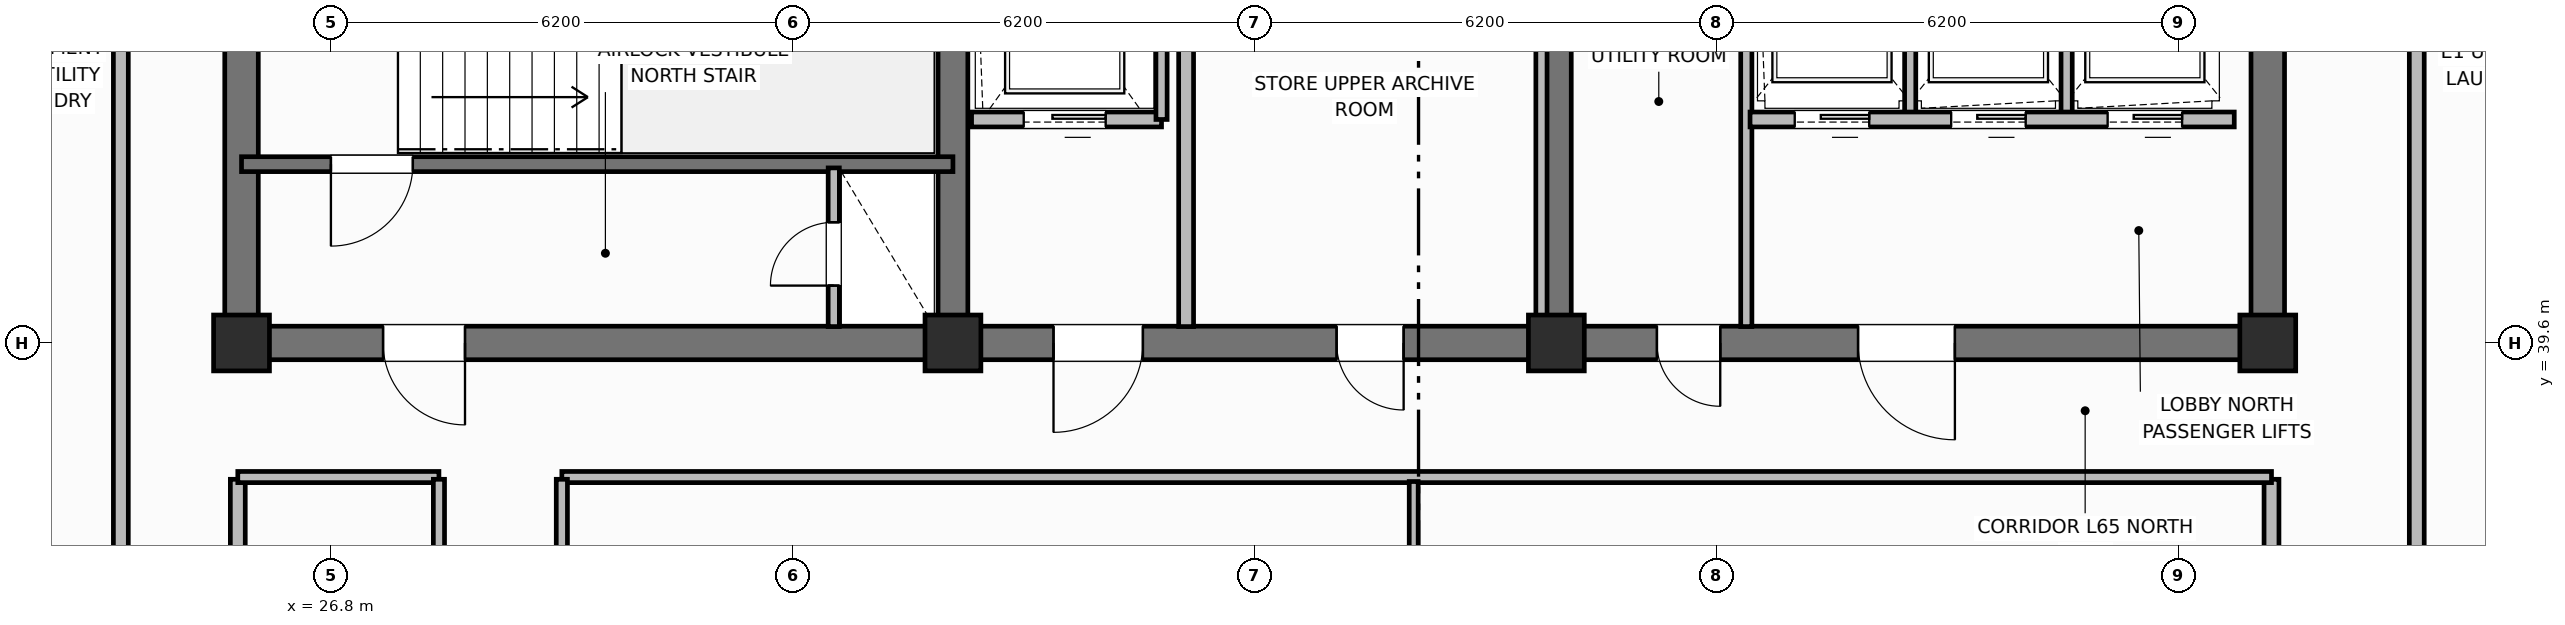
"""IFC4 building model, lengths in metres.
Left out: names, types, materials, properties, quantities, classifications, styles, units other than length and angle.
Written with IfcOpenShell. Run it as: python <this file> out.ifc"""

import sys

from ifc_helpers import new_model, si_unit, direction, frame, frame_2d, origin, origin_2d, place, context, subcontext, project, spatial, rectangle, extrude, element, fill, save


model = new_model("IFC4")
c1 = context("Model", 3, precision=1e-05, world=origin(), true_north=direction((0.0, 1.0)))
c2 = subcontext(c1, "Body", "Model", "MODEL_VIEW")
j1 = project(units=[si_unit("LENGTHUNIT", "METRE"), si_unit("PLANEANGLEUNIT", "RADIAN")], contexts=[c1])
p1 = place(None, origin())
s1 = spatial("IfcSite", under=j1, at=p1, CompositionType="ELEMENT")
p2 = place(p1, origin())
s2 = spatial("IfcBuilding", under=s1, at=p2, CompositionType="ELEMENT")
p3 = place(p2, frame((0.0, 0.0, 260.2)))
s3 = spatial("IfcBuildingStorey", under=s2, at=p3, CompositionType="ELEMENT", Elevation=260.2)
for number, where, z_axis, x_axis in (
    (1, (25.6, 39.825, 0.0), (0.0, 0.0, 1.0), (0.0, 1.0, 0.0)),
    (2, (52.8, 39.825, 0.0), (0.0, 0.0, 1.0), (0.0, 1.0, 0.0)),
):
    element("IfcWall", number, at=place(p3, frame(where, z_axis=z_axis, x_axis=x_axis)), inside=s3, PredefinedType="SHEAR", context=c2, shape_type="SweptSolid", body=[
        extrude(rectangle(XDim=5.75, YDim=0.45, at=frame_2d((2.875, 0.0))), origin(), (0.0, 0.0, 1.0), 3.7),
    ])
p4 = place(p3, frame((52.8, 39.6, 0.0), z_axis=(0.0, 0.0, 1.0), x_axis=(-1.0, 0.0, 0.0)))
e3 = element("IfcWall", 3, at=p4, inside=s3, PredefinedType="SHEAR", context=c2, shape_type="SweptSolid", body=[
    extrude(rectangle(XDim=27.2, YDim=0.45, at=frame_2d((13.6, 0.0))), origin(), (0.0, 0.0, 1.0), 3.7),
])
p5 = place(p4, frame((24.2, 0.0, 0.0)))
e4 = element("IfcOpeningElement", 4, at=p5, cuts=e3, PredefinedType="OPENING", context=c2, shape_type="SweptSolid", body=[
    extrude(rectangle(XDim=1.1, YDim=2.15, at=frame_2d((0.55, 1.075))), frame((0.0, 0.235, 0.0), z_axis=(0.0, -1.0, 0.0), x_axis=(1.0, 0.0, 0.0)), (0.0, 0.0, 1.0), 0.47),
])
p6 = place(p4, frame((15.1, 0.0, 0.0)))
e5 = element("IfcOpeningElement", 5, at=p6, cuts=e3, PredefinedType="OPENING", context=c2, shape_type="SweptSolid", body=[
    extrude(rectangle(XDim=1.2, YDim=2.15, at=frame_2d((0.6, 1.075))), frame((0.0, 0.235, 0.0), z_axis=(0.0, -1.0, 0.0), x_axis=(1.0, 0.0, 0.0)), (0.0, 0.0, 1.0), 0.47),
])
p7 = place(p4, frame((11.6, 0.0, 0.0)))
e6 = element("IfcOpeningElement", 6, at=p7, cuts=e3, PredefinedType="OPENING", context=c2, shape_type="SweptSolid", body=[
    extrude(rectangle(XDim=0.9, YDim=2.1, at=frame_2d((0.45, 1.05))), frame((0.0, 0.235, 0.0), z_axis=(0.0, -1.0, 0.0), x_axis=(1.0, 0.0, 0.0)), (0.0, 0.0, 1.0), 0.47),
])
p8 = place(p4, frame((7.35, 0.0, 0.0)))
e7 = element("IfcOpeningElement", 7, at=p8, cuts=e3, PredefinedType="OPENING", context=c2, shape_type="SweptSolid", body=[
    extrude(rectangle(XDim=0.85, YDim=2.1, at=frame_2d((0.425, 1.05))), frame((0.0, 0.235, 0.0), z_axis=(0.0, -1.0, 0.0), x_axis=(1.0, 0.0, 0.0)), (0.0, 0.0, 1.0), 0.47),
])
p9 = place(p4, frame((4.2, 0.0, 0.0)))
e8 = element("IfcOpeningElement", 8, at=p9, cuts=e3, PredefinedType="OPENING", context=c2, shape_type="SweptSolid", body=[
    extrude(rectangle(XDim=1.3, YDim=2.2, at=frame_2d((0.65, 1.1))), frame((0.0, 0.235, 0.0), z_axis=(0.0, -1.0, 0.0), x_axis=(1.0, 0.0, 0.0)), (0.0, 0.0, 1.0), 0.47),
])
for number, where, z_axis, x_axis in (
    (9, (35.15, 39.825, 0.0), (0.0, 0.0, 1.0), (0.0, 1.0, 0.0)),
    (10, (43.25, 39.825, 0.0), (0.0, 0.0, 1.0), (0.0, 1.0, 0.0)),
):
    element("IfcWall", number, at=place(p3, frame(where, z_axis=z_axis, x_axis=x_axis)), inside=s3, PredefinedType="SHEAR", context=c2, shape_type="SweptSolid", body=[
        extrude(rectangle(XDim=5.75, YDim=0.4, at=frame_2d((2.875, 0.0))), origin(), (0.0, 0.0, 1.0), 3.7),
    ])
for number, where, z_axis, x_axis in (
    (11, (25.6, 39.6, 0.0), (0.0, 0.0, 1.0), (1.0, 0.0, 0.0)),
    (12, (35.15, 39.6, 0.0), (0.0, 0.0, 1.0), (1.0, 0.0, 0.0)),
    (13, (43.25, 39.6, 0.0), (0.0, 0.0, 1.0), (1.0, 0.0, 0.0)),
    (14, (52.8, 39.6, 0.0), (0.0, 0.0, 1.0), (1.0, 0.0, 0.0)),
):
    element("IfcColumn", number, at=place(p3, frame(where, z_axis=z_axis, x_axis=x_axis)), inside=s3, PredefinedType="COLUMN", context=c2, shape_type="SweptSolid", body=[
        extrude(rectangle(XDim=0.75, YDim=0.75, at=origin_2d()), origin(), (0.0, 0.0, 1.0), 3.7),
    ])
p10 = place(p3, frame((35.15, 42.0, 0.0), z_axis=(0.0, 0.0, 1.0), x_axis=(-1.0, 0.0, 0.0)))
e15 = element("IfcWall", 15, at=p10, inside=s3, PredefinedType="SHEAR", context=c2, shape_type="SweptSolid", body=[
    extrude(rectangle(XDim=9.55, YDim=0.2, at=frame_2d((4.775, 0.0))), origin(), (0.0, 0.0, 1.0), 3.7),
])
p11 = place(p10, frame((7.25, 0.0, 0.0)))
e16 = element("IfcOpeningElement", 16, at=p11, cuts=e15, PredefinedType="OPENING", context=c2, shape_type="SweptSolid", body=[
    extrude(rectangle(XDim=1.1, YDim=2.15, at=frame_2d((0.55, 1.075))), frame((0.0, 0.11, 0.0), z_axis=(0.0, -1.0, 0.0), x_axis=(1.0, 0.0, 0.0)), (0.0, 0.0, 1.0), 0.22),
])
p12 = place(p3, frame((33.55, 39.82, 0.0), z_axis=(0.0, 0.0, 1.0), x_axis=(0.0, 1.0, 0.0)))
e17 = element("IfcWall", 17, at=p12, inside=s3, PredefinedType="PARTITIONING", context=c2, shape_type="SweptSolid", body=[
    extrude(rectangle(XDim=2.13, YDim=0.15, at=frame_2d((1.065, 0.0))), origin(), (0.0, 0.0, 1.0), 2.56),
])
p13 = place(p12, frame((0.55, 0.0, 0.0)))
e18 = element("IfcOpeningElement", 18, at=p13, cuts=e17, PredefinedType="OPENING", context=c2, shape_type="SweptSolid", body=[
    extrude(rectangle(XDim=0.85, YDim=2.05, at=frame_2d((0.425, 1.025))), frame((0.0, 0.085, 0.0), z_axis=(0.0, -1.0, 0.0), x_axis=(1.0, 0.0, 0.0)), (0.0, 0.0, 1.0), 0.17),
])
p14 = place(p3, frame((37.95, 42.6, 0.0), z_axis=(0.0, 0.0, 1.0), x_axis=(-1.0, 0.0, 0.0)))
e19 = element("IfcWall", 19, at=p14, inside=s3, PredefinedType="PARTITIONING", context=c2, shape_type="SweptSolid", body=[
    extrude(rectangle(XDim=2.55, YDim=0.2, at=frame_2d((1.275, 0.0))), origin(), (0.0, 0.0, 1.0), 2.33),
])
p15 = place(p14, frame((0.75, 0.0, 0.0)))
e20 = element("IfcOpeningElement", 20, at=p15, cuts=e19, PredefinedType="OPENING", context=c2, shape_type="SweptSolid", body=[
    extrude(rectangle(XDim=1.1, YDim=2.15, at=frame_2d((0.55, 1.075))), frame((0.0, 0.11, 0.0), z_axis=(0.0, -1.0, 0.0), x_axis=(1.0, 0.0, 0.0)), (0.0, 0.0, 1.0), 0.22),
])
p16 = place(p3, frame((37.95, 42.6, 0.0), z_axis=(0.0, 0.0, 1.0), x_axis=(0.0, 1.0, 0.0)))
e21 = element("IfcWall", 21, at=p16, inside=s3, PredefinedType="PARTITIONING", context=c2, shape_type="SweptSolid", body=[
    extrude(rectangle(XDim=2.85, YDim=0.15, at=frame_2d((1.425, 0.0))), origin(), (0.0, 0.0, 1.0), 2.56),
])
p17 = place(p3, frame((38.28, 39.82, 0.0), z_axis=(0.0, 0.0, 1.0), x_axis=(0.0, 1.0, 0.0)))
e22 = element("IfcWall", 22, at=p17, inside=s3, PredefinedType="PARTITIONING", context=c2, shape_type="SweptSolid", body=[
    extrude(rectangle(XDim=5.63, YDim=0.2, at=frame_2d((2.815, 0.0))), origin(), (0.0, 0.0, 1.0), 2.56),
])
for number, where, z_axis, x_axis in (
    (23, (43.05, 39.82, 0.0), (0.0, 0.0, 1.0), (0.0, 1.0, 0.0)),
    (24, (45.8, 39.82, 0.0), (0.0, 0.0, 1.0), (0.0, 1.0, 0.0)),
):
    element("IfcWall", number, at=place(p3, frame(where, z_axis=z_axis, x_axis=x_axis)), inside=s3, PredefinedType="PARTITIONING", context=c2, shape_type="SweptSolid", body=[
        extrude(rectangle(XDim=5.63, YDim=0.15, at=frame_2d((2.815, 0.0))), origin(), (0.0, 0.0, 1.0), 2.56),
    ])
for number, where, z_axis, x_axis in (
    (25, (48.0, 42.65, 0.0), (0.0, 0.0, 1.0), (0.0, 1.0, 0.0)),
    (26, (50.1, 42.65, 0.0), (0.0, 0.0, 1.0), (0.0, 1.0, 0.0)),
):
    element("IfcWall", number, at=place(p3, frame(where, z_axis=z_axis, x_axis=x_axis)), inside=s3, PredefinedType="PARTITIONING", context=c2, shape_type="SweptSolid", body=[
        extrude(rectangle(XDim=2.8, YDim=0.15, at=frame_2d((1.4, 0.0))), origin(), (0.0, 0.0, 1.0), 2.56),
    ])
p18 = place(p3, frame((52.35, 42.6, 0.0), z_axis=(0.0, 0.0, 1.0), x_axis=(-1.0, 0.0, 0.0)))
e27 = element("IfcWall", 27, at=p18, inside=s3, PredefinedType="PARTITIONING", context=c2, shape_type="SweptSolid", body=[
    extrude(rectangle(XDim=6.5, YDim=0.2, at=frame_2d((3.25, 0.0))), origin(), (0.0, 0.0, 1.0), 2.56),
])
p19 = place(p18, frame((4.9, 0.0, 0.0)))
e28 = element("IfcOpeningElement", 28, at=p19, cuts=e27, PredefinedType="OPENING", context=c2, shape_type="SweptSolid", body=[
    extrude(rectangle(XDim=1.0, YDim=2.15, at=frame_2d((0.5, 1.075))), frame((0.0, 0.11, 0.0), z_axis=(0.0, -1.0, 0.0), x_axis=(1.0, 0.0, 0.0)), (0.0, 0.0, 1.0), 0.22),
])
p20 = place(p18, frame((2.8, 0.0, 0.0)))
e29 = element("IfcOpeningElement", 29, at=p20, cuts=e27, PredefinedType="OPENING", context=c2, shape_type="SweptSolid", body=[
    extrude(rectangle(XDim=1.0, YDim=2.15, at=frame_2d((0.5, 1.075))), frame((0.0, 0.11, 0.0), z_axis=(0.0, -1.0, 0.0), x_axis=(1.0, 0.0, 0.0)), (0.0, 0.0, 1.0), 0.22),
])
p21 = place(p18, frame((0.7, 0.0, 0.0)))
e30 = element("IfcOpeningElement", 30, at=p21, cuts=e27, PredefinedType="OPENING", context=c2, shape_type="SweptSolid", body=[
    extrude(rectangle(XDim=1.0, YDim=2.15, at=frame_2d((0.5, 1.075))), frame((0.0, 0.11, 0.0), z_axis=(0.0, -1.0, 0.0), x_axis=(1.0, 0.0, 0.0)), (0.0, 0.0, 1.0), 0.22),
])
for number, where, z_axis, x_axis in (
    (31, (25.55, 18.63, 0.0), (0.0, 0.0, 1.0), (0.0, 1.0, 0.0)),
    (32, (52.85, 18.63, 0.0), (0.0, 0.0, 1.0), (0.0, 1.0, 0.0)),
):
    element("IfcWall", number, at=place(p3, frame(where, z_axis=z_axis, x_axis=x_axis)), inside=s3, PredefinedType="PARTITIONING", context=c2, shape_type="SweptSolid", body=[
        extrude(rectangle(XDim=19.14, YDim=0.2, at=frame_2d((9.57, 0.0))), origin(), (0.0, 0.0, 1.0), 2.56),
    ])
p22 = place(p3, frame((25.55, 37.8, 0.0), z_axis=(0.0, 0.0, 1.0), x_axis=(1.0, 0.0, 0.0)))
e33 = element("IfcWall", 33, at=p22, inside=s3, PredefinedType="PARTITIONING", context=c2, shape_type="SweptSolid", body=[
    extrude(rectangle(XDim=2.7, YDim=0.15, at=frame_2d((1.35, 0.0))), origin(), (0.0, 0.0, 1.0), 2.56),
])
p23 = place(p3, frame((29.9, 37.8, 0.0), z_axis=(0.0, 0.0, 1.0), x_axis=(1.0, 0.0, 0.0)))
e34 = element("IfcWall", 34, at=p23, inside=s3, PredefinedType="PARTITIONING", context=c2, shape_type="SweptSolid", body=[
    extrude(rectangle(XDim=22.95, YDim=0.15, at=frame_2d((11.475, 0.0))), origin(), (0.0, 0.0, 1.0), 2.56),
])
p24 = place(p3, frame((41.335, 25.56, 0.0), z_axis=(0.0, 0.0, 1.0), x_axis=(0.0, 1.0, 0.0)))
e35 = element("IfcWall", 35, at=p24, inside=s3, PredefinedType="PARTITIONING", context=c2, shape_type="SweptSolid", body=[
    extrude(rectangle(XDim=12.18, YDim=0.12, at=frame_2d((6.09, 0.0))), origin(), (0.0, 0.0, 1.0), 2.56),
])
p25 = place(p24, frame((2.0, 0.0, 0.0)))
e36 = element("IfcOpeningElement", 36, at=p25, cuts=e35, PredefinedType="OPENING", context=c2, shape_type="SweptSolid", body=[
    extrude(rectangle(XDim=0.9, YDim=2.1, at=frame_2d((0.45, 1.05))), frame((0.0, 0.07, 0.0), z_axis=(0.0, -1.0, 0.0), x_axis=(1.0, 0.0, 0.0)), (0.0, 0.0, 1.0), 0.14),
])
p26 = place(p3, frame((28.25, 18.63, 0.0), z_axis=(0.0, 0.0, 1.0), x_axis=(0.0, 1.0, 0.0)))
e37 = element("IfcWall", 37, at=p26, inside=s3, PredefinedType="PARTITIONING", context=c2, shape_type="SweptSolid", body=[
    extrude(rectangle(XDim=19.14, YDim=0.15, at=frame_2d((9.57, 0.0))), origin(), (0.0, 0.0, 1.0), 2.56),
])
p27 = place(p26, frame((3.0, 0.0, 0.0)))
e38 = element("IfcOpeningElement", 38, at=p27, cuts=e37, PredefinedType="OPENING", context=c2, shape_type="SweptSolid", body=[
    extrude(rectangle(XDim=0.9, YDim=2.1, at=frame_2d((0.45, 1.05))), frame((0.0, 0.085, 0.0), z_axis=(0.0, -1.0, 0.0), x_axis=(1.0, 0.0, 0.0)), (0.0, 0.0, 1.0), 0.17),
])
p28 = place(p26, frame((11.5, 0.0, 0.0)))
e39 = element("IfcOpeningElement", 39, at=p28, cuts=e37, PredefinedType="OPENING", context=c2, shape_type="SweptSolid", body=[
    extrude(rectangle(XDim=0.9, YDim=2.1, at=frame_2d((0.45, 1.05))), frame((0.0, 0.085, 0.0), z_axis=(0.0, -1.0, 0.0), x_axis=(1.0, 0.0, 0.0)), (0.0, 0.0, 1.0), 0.17),
])
p29 = place(p3, frame((29.9, 18.63, 0.0), z_axis=(0.0, 0.0, 1.0), x_axis=(0.0, 1.0, 0.0)))
e40 = element("IfcWall", 40, at=p29, inside=s3, PredefinedType="PARTITIONING", context=c2, shape_type="SweptSolid", body=[
    extrude(rectangle(XDim=19.14, YDim=0.15, at=frame_2d((9.57, 0.0))), origin(), (0.0, 0.0, 1.0), 2.56),
])
p30 = place(p29, frame((2.2, 0.0, 0.0)))
e41 = element("IfcOpeningElement", 41, at=p30, cuts=e40, PredefinedType="OPENING", context=c2, shape_type="SweptSolid", body=[
    extrude(rectangle(XDim=1.0, YDim=2.15, at=frame_2d((0.5, 1.075))), frame((0.0, 0.085, 0.0), z_axis=(0.0, -1.0, 0.0), x_axis=(1.0, 0.0, 0.0)), (0.0, 0.0, 1.0), 0.17),
])
p31 = place(p29, frame((8.89, 0.0, 0.0)))
e42 = element("IfcOpeningElement", 42, at=p31, cuts=e40, PredefinedType="OPENING", context=c2, shape_type="SweptSolid", body=[
    extrude(rectangle(XDim=1.0, YDim=2.15, at=frame_2d((0.5, 1.075))), frame((0.0, 0.085, 0.0), z_axis=(0.0, -1.0, 0.0), x_axis=(1.0, 0.0, 0.0)), (0.0, 0.0, 1.0), 0.17),
])
p32 = place(p3, frame((23.98, 9.95, 0.0), z_axis=(0.0, 0.0, 1.0), x_axis=(0.0, 1.0, 0.0)))
e43 = element("IfcWall", 43, at=p32, inside=s3, PredefinedType="PARTITIONING", context=c2, shape_type="SweptSolid", body=[
    extrude(rectangle(XDim=36.5, YDim=0.2, at=frame_2d((18.25, 0.0))), origin(), (0.0, 0.0, 1.0), 2.56),
])
p33 = place(p32, frame((3.25, 0.0, 0.0)))
e44 = element("IfcOpeningElement", 44, at=p33, cuts=e43, PredefinedType="OPENING", context=c2, shape_type="SweptSolid", body=[
    extrude(rectangle(XDim=1.0, YDim=2.15, at=frame_2d((0.5, 1.075))), frame((0.0, 0.11, 0.0), z_axis=(0.0, -1.0, 0.0), x_axis=(1.0, 0.0, 0.0)), (0.0, 0.0, 1.0), 0.22),
])
p34 = place(p3, frame((54.8, 9.95, 0.0), z_axis=(0.0, 0.0, 1.0), x_axis=(0.0, 1.0, 0.0)))
e45 = element("IfcWall", 45, at=p34, inside=s3, PredefinedType="PARTITIONING", context=c2, shape_type="SweptSolid", body=[
    extrude(rectangle(XDim=36.5, YDim=0.2, at=frame_2d((18.25, 0.0))), origin(), (0.0, 0.0, 1.0), 2.56),
])
p35 = place(p34, frame((3.25, 0.0, 0.0)))
e46 = element("IfcOpeningElement", 46, at=p35, cuts=e45, PredefinedType="OPENING", context=c2, shape_type="SweptSolid", body=[
    extrude(rectangle(XDim=1.0, YDim=2.15, at=frame_2d((0.5, 1.075))), frame((0.0, 0.11, 0.0), z_axis=(0.0, -1.0, 0.0), x_axis=(1.0, 0.0, 0.0)), (0.0, 0.0, 1.0), 0.22),
])
p36 = place(p11, origin())
e47 = element("IfcDoor", 47, at=p36, inside=s3, OperationType="SINGLE_SWING_RIGHT", PredefinedType="DOOR", context=c2, shape_type="SweptSolid", body=[
    extrude(rectangle(XDim=1.1, YDim=2.15, at=frame_2d((0.55, 1.075))), frame((0.0, 0.025, 0.0), z_axis=(0.0, -1.0, 0.0), x_axis=(1.0, 0.0, 0.0)), (0.0, 0.0, 1.0), 0.05),
])
fill(e16, e47)
p37 = place(p13, origin())
e48 = element("IfcDoor", 48, at=p37, inside=s3, OperationType="SINGLE_SWING_LEFT", PredefinedType="TRAPDOOR", context=c2, shape_type="SweptSolid", body=[
    extrude(rectangle(XDim=0.85, YDim=2.05, at=frame_2d((0.425, 1.025))), frame((0.0, 0.025, 0.0), z_axis=(0.0, -1.0, 0.0), x_axis=(1.0, 0.0, 0.0)), (0.0, 0.0, 1.0), 0.05),
])
fill(e18, e48)
p38 = place(p15, origin())
e49 = element("IfcDoor", 49, at=p38, inside=s3, OperationType="SLIDING_TO_LEFT", PredefinedType="DOOR", context=c2, shape_type="SweptSolid", body=[
    extrude(rectangle(XDim=1.1, YDim=2.15, at=frame_2d((0.55, 1.075))), frame((0.0, 0.025, 0.0), z_axis=(0.0, -1.0, 0.0), x_axis=(1.0, 0.0, 0.0)), (0.0, 0.0, 1.0), 0.05),
])
fill(e20, e49)
p39 = place(p19, origin())
e50 = element("IfcDoor", 50, at=p39, inside=s3, OperationType="SLIDING_TO_LEFT", PredefinedType="DOOR", context=c2, shape_type="SweptSolid", body=[
    extrude(rectangle(XDim=1.0, YDim=2.15, at=frame_2d((0.5, 1.075))), frame((0.0, 0.025, 0.0), z_axis=(0.0, -1.0, 0.0), x_axis=(1.0, 0.0, 0.0)), (0.0, 0.0, 1.0), 0.05),
])
fill(e28, e50)
p40 = place(p20, origin())
e51 = element("IfcDoor", 51, at=p40, inside=s3, OperationType="SLIDING_TO_LEFT", PredefinedType="DOOR", context=c2, shape_type="SweptSolid", body=[
    extrude(rectangle(XDim=1.0, YDim=2.15, at=frame_2d((0.5, 1.075))), frame((0.0, 0.025, 0.0), z_axis=(0.0, -1.0, 0.0), x_axis=(1.0, 0.0, 0.0)), (0.0, 0.0, 1.0), 0.05),
])
fill(e29, e51)
p41 = place(p21, origin())
e52 = element("IfcDoor", 52, at=p41, inside=s3, OperationType="SLIDING_TO_LEFT", PredefinedType="DOOR", context=c2, shape_type="SweptSolid", body=[
    extrude(rectangle(XDim=1.0, YDim=2.15, at=frame_2d((0.5, 1.075))), frame((0.0, 0.025, 0.0), z_axis=(0.0, -1.0, 0.0), x_axis=(1.0, 0.0, 0.0)), (0.0, 0.0, 1.0), 0.05),
])
fill(e30, e52)
p42 = place(p5, origin())
e53 = element("IfcDoor", 53, at=p42, inside=s3, OperationType="SINGLE_SWING_LEFT", PredefinedType="DOOR", context=c2, shape_type="SweptSolid", body=[
    extrude(rectangle(XDim=1.1, YDim=2.15, at=frame_2d((0.55, 1.075))), frame((0.0, 0.025, 0.0), z_axis=(0.0, -1.0, 0.0), x_axis=(1.0, 0.0, 0.0)), (0.0, 0.0, 1.0), 0.05),
])
fill(e4, e53)
p43 = place(p6, origin())
e54 = element("IfcDoor", 54, at=p43, inside=s3, OperationType="SINGLE_SWING_RIGHT", PredefinedType="DOOR", context=c2, shape_type="SweptSolid", body=[
    extrude(rectangle(XDim=1.2, YDim=2.15, at=frame_2d((0.6, 1.075))), frame((0.0, 0.025, 0.0), z_axis=(0.0, -1.0, 0.0), x_axis=(1.0, 0.0, 0.0)), (0.0, 0.0, 1.0), 0.05),
])
fill(e5, e54)
p44 = place(p7, origin())
e55 = element("IfcDoor", 55, at=p44, inside=s3, OperationType="SINGLE_SWING_LEFT", PredefinedType="DOOR", context=c2, shape_type="SweptSolid", body=[
    extrude(rectangle(XDim=0.9, YDim=2.1, at=frame_2d((0.45, 1.05))), frame((0.0, 0.025, 0.0), z_axis=(0.0, -1.0, 0.0), x_axis=(1.0, 0.0, 0.0)), (0.0, 0.0, 1.0), 0.05),
])
fill(e6, e55)
p45 = place(p8, origin())
e56 = element("IfcDoor", 56, at=p45, inside=s3, OperationType="SINGLE_SWING_LEFT", PredefinedType="DOOR", context=c2, shape_type="SweptSolid", body=[
    extrude(rectangle(XDim=0.85, YDim=2.1, at=frame_2d((0.425, 1.05))), frame((0.0, 0.025, 0.0), z_axis=(0.0, -1.0, 0.0), x_axis=(1.0, 0.0, 0.0)), (0.0, 0.0, 1.0), 0.05),
])
fill(e7, e56)
p46 = place(p9, origin())
e57 = element("IfcDoor", 57, at=p46, inside=s3, OperationType="SINGLE_SWING_LEFT", PredefinedType="DOOR", context=c2, shape_type="SweptSolid", body=[
    extrude(rectangle(XDim=1.3, YDim=2.2, at=frame_2d((0.65, 1.1))), frame((0.0, 0.025, 0.0), z_axis=(0.0, -1.0, 0.0), x_axis=(1.0, 0.0, 0.0)), (0.0, 0.0, 1.0), 0.05),
])
fill(e8, e57)
save(model, sys.argv[1])
